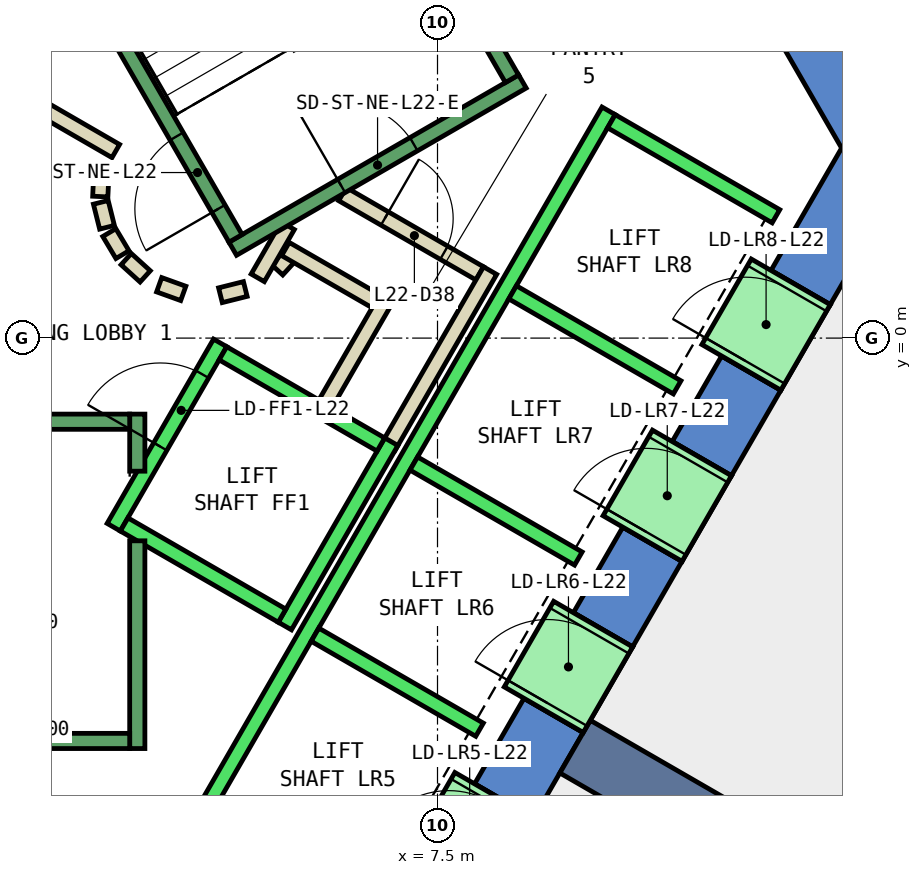
"""IFC4 building model, lengths in metres.
Left out: names, types, materials, properties, quantities, classifications, styles, units other than length and angle.
Written with IfcOpenShell. Run it as: python <this file> out.ifc"""

import sys

from ifc_helpers import new_model, si_unit, direction, frame, frame_2d, origin, place, context, subcontext, project, spatial, polyline, rectangle, outline, extrude, element, fill, save


model = new_model("IFC4")
c1 = context("Model", 3, precision=1e-05, world=origin(), true_north=direction((0.0, 1.0)))
c2 = subcontext(c1, "Body", "Model", "MODEL_VIEW")
j1 = project(units=[si_unit("LENGTHUNIT", "METRE"), si_unit("PLANEANGLEUNIT", "RADIAN")], contexts=[c1])
p1 = place(None, origin())
s1 = spatial("IfcSite", under=j1, at=p1, CompositionType="ELEMENT")
p2 = place(p1, origin())
s2 = spatial("IfcBuilding", under=s1, at=p2, CompositionType="ELEMENT")
p3 = place(p2, frame((0.0, 0.0, 103.4)))
s3 = spatial("IfcBuildingStorey", under=s2, at=p3, CompositionType="ELEMENT", Elevation=103.4)
p4 = place(p3, frame((0.0, 0.0, -0.4)))
e1 = element("IfcWall", 1, at=p4, inside=s3, PredefinedType="SHEAR", context=c2, shape_type="SweptSolid", body=[
    extrude(outline(polyline([(8.517, 11.748), (7.738, 11.298), (12.817, 2.5), (13.856, 2.5), (8.517, 11.748)])), origin(), (0.0, 0.0, 1.0), 4.2),
])
p5 = place(p3, frame((0.0, 0.0, -0.4)))
e2 = element("IfcWall", 2, at=p5, inside=s3, PredefinedType="SHEAR", context=c2, shape_type="SweptSolid", body=[
    extrude(outline(polyline([(9.417, -5.189), (8.638, -4.739), (7.988, -5.864), (8.767, -6.314), (9.417, -5.189)])), origin(), (0.0, 0.0, 1.0), 4.2),
])
p6 = place(p3, frame((0.0, 0.0, -0.4)))
e3 = element("IfcWall", 3, at=p6, inside=s3, PredefinedType="SHEAR", context=c2, shape_type="SweptSolid", body=[
    extrude(outline(polyline([(10.717, -2.937), (9.938, -2.487), (9.288, -3.613), (10.067, -4.063), (10.717, -2.937)])), origin(), (0.0, 0.0, 1.0), 4.2),
])
p7 = place(p3, frame((0.0, 0.0, -0.4)))
e4 = element("IfcWall", 4, at=p7, inside=s3, PredefinedType="SHEAR", context=c2, shape_type="SweptSolid", body=[
    extrude(outline(polyline([(12.017, -0.686), (11.238, -0.236), (10.588, -1.361), (11.367, -1.811), (12.017, -0.686)])), origin(), (0.0, 0.0, 1.0), 4.2),
])
p8 = place(p3, frame((0.0, 0.0, -0.4)))
e5 = element("IfcWall", 5, at=p8, inside=s3, PredefinedType="SHEAR", context=c2, shape_type="SweptSolid", body=[
    extrude(outline(polyline([(11.888, 0.89), (12.667, 0.44), (13.856, 2.5), (12.817, 2.5), (11.888, 0.89)])), origin(), (0.0, 0.0, 1.0), 4.2),
])
p9 = place(p3, frame((0.0, 0.0, 3.6)))
e6 = element("IfcWall", 6, at=p9, inside=s3, PredefinedType="SHEAR", context=c2, shape_type="SweptSolid", body=[
    extrude(outline(polyline([(8.767, -6.314), (7.988, -5.864), (7.338, -6.99), (8.117, -7.44), (8.767, -6.314)])), origin(), (0.0, 0.0, 1.0), 0.2),
])
p10 = place(p3, frame((0.0, 0.0, 3.6)))
e7 = element("IfcWall", 7, at=p10, inside=s3, PredefinedType="SHEAR", context=c2, shape_type="SweptSolid", body=[
    extrude(outline(polyline([(10.067, -4.063), (9.288, -3.613), (8.638, -4.739), (9.417, -5.189), (10.067, -4.063)])), origin(), (0.0, 0.0, 1.0), 0.2),
])
p11 = place(p3, frame((0.0, 0.0, 3.6)))
e8 = element("IfcWall", 8, at=p11, inside=s3, PredefinedType="SHEAR", context=c2, shape_type="SweptSolid", body=[
    extrude(outline(polyline([(11.367, -1.811), (10.588, -1.361), (9.938, -2.487), (10.717, -2.937), (11.367, -1.811)])), origin(), (0.0, 0.0, 1.0), 0.2),
])
p12 = place(p3, frame((0.0, 0.0, 3.6)))
e9 = element("IfcWall", 9, at=p12, inside=s3, PredefinedType="SHEAR", context=c2, shape_type="SweptSolid", body=[
    extrude(outline(polyline([(12.667, 0.44), (11.888, 0.89), (11.238, -0.236), (12.017, -0.686), (12.667, 0.44)])), origin(), (0.0, 0.0, 1.0), 0.2),
])
p13 = place(p3, frame((9.31, -5.375, -0.4), z_axis=(0.0, 0.0, 1.0), x_axis=(0.866017533419, -0.500013631625, 0.0)))
e10 = element("IfcWall", 10, at=p13, inside=s3, PredefinedType="SHEAR", context=c2, shape_type="SweptSolid", body=[
    extrude(rectangle(XDim=9.0, YDim=0.8, at=frame_2d((4.5, 0.0))), origin(), (0.0, 0.0, 1.0), 4.2),
])
p14 = place(p3, frame((5.39, 0.898, 0.0), z_axis=(0.0, 0.0, 1.0), x_axis=(0.673828488714, 0.738887791073, 0.0)))
e11 = element("IfcWall", 11, at=p14, inside=s3, PredefinedType="PARTITIONING", context=c2, shape_type="SweptSolid", body=[
    extrude(rectangle(XDim=0.263, YDim=0.2, at=frame_2d((0.131, 0.0))), origin(), (0.0, 0.0, 1.0), 3.8),
])
p15 = place(p3, frame((5.499, 1.172, 0.0), z_axis=(0.0, 0.0, 1.0), x_axis=(0.866333505267, -0.499465972466, 0.0)))
e12 = element("IfcWall", 12, at=p15, inside=s3, PredefinedType="PARTITIONING", context=c2, shape_type="SweptSolid", body=[
    extrude(rectangle(XDim=1.374, YDim=0.2, at=frame_2d((0.687, 0.0))), origin(), (0.0, 0.0, 1.0), 3.8),
])
p16 = place(p3, frame((6.826, 0.522, 0.0), z_axis=(0.0, 0.0, 1.0), x_axis=(-0.500016722714, -0.866015748706, 0.0)))
e13 = element("IfcWall", 13, at=p16, inside=s3, PredefinedType="PARTITIONING", context=c2, shape_type="SweptSolid", body=[
    extrude(rectangle(XDim=1.7, YDim=0.2, at=frame_2d((0.85, 0.0))), origin(), (0.0, 0.0, 1.0), 3.8),
])
p17 = place(p3, frame((6.25, 1.894, 0.0), z_axis=(0.0, 0.0, 1.0), x_axis=(0.866043184279, -0.499969202016, 0.0)))
e14 = element("IfcWall", 14, at=p17, inside=s3, PredefinedType="PARTITIONING", context=c2, shape_type="SweptSolid", body=[
    extrude(rectangle(XDim=2.084, YDim=0.2, at=frame_2d((1.042, 0.0))), origin(), (0.0, 0.0, 1.0), 3.8),
])
p18 = place(p17, frame((0.642, 0.0, 0.0)))
e15 = element("IfcOpeningElement", 15, at=p18, cuts=e14, PredefinedType="OPENING", context=c2, shape_type="SweptSolid", body=[
    extrude(rectangle(XDim=0.9, YDim=2.1, at=frame_2d((0.45, 1.05))), frame((0.0, 0.11, 0.0), z_axis=(0.0, -1.0, 0.0), x_axis=(1.0, 0.0, 0.0)), (0.0, 0.0, 1.0), 0.22),
])
p19 = place(p3, frame((8.192, 0.888, 0.0), z_axis=(0.0, 0.0, 1.0), x_axis=(-0.499940625693, -0.866059680843, 0.0)))
e16 = element("IfcWall", 16, at=p19, inside=s3, PredefinedType="PARTITIONING", context=c2, shape_type="SweptSolid", body=[
    extrude(rectangle(XDim=2.68, YDim=0.2, at=frame_2d((1.34, 0.0))), origin(), (0.0, 0.0, 1.0), 3.8),
])
p20 = place(p3, frame((5.135, 0.793, 0.0), z_axis=(0.0, 0.0, 1.0), x_axis=(0.499526442893, 0.866298639529, 0.0)))
e17 = element("IfcWall", 17, at=p20, inside=s3, PredefinedType="PARTITIONING", context=c2, shape_type="SweptSolid", body=[
    extrude(rectangle(XDim=0.791, YDim=0.2, at=frame_2d((0.396, 0.0))), origin(), (0.0, 0.0, 1.0), 3.8),
])
p21 = place(p3, frame((2.012, 3.186, 0.0), z_axis=(0.0, 0.0, 1.0), x_axis=(0.865891012941, -0.500232699559, 0.0)))
e18 = element("IfcWall", 18, at=p21, inside=s3, PredefinedType="PARTITIONING", context=c2, shape_type="SweptSolid", body=[
    extrude(rectangle(XDim=1.449, YDim=0.2, at=frame_2d((0.725, 0.0))), origin(), (0.0, 0.0, 1.0), 3.8),
])
p22 = place(p3, frame((3.079, 2.199, 0.0), z_axis=(0.0, 0.0, 1.0), x_axis=(-0.047771483479, -0.998858290933, 0.0)))
e19 = element("IfcWall", 19, at=p22, inside=s3, PredefinedType="PARTITIONING", context=c2, shape_type="SweptSolid", body=[
    extrude(rectangle(XDim=0.337, YDim=0.2, at=frame_2d((0.169, 0.0))), origin(), (0.0, 0.0, 1.0), 3.8),
])
p23 = place(p3, frame((3.07, 1.786, 0.0), z_axis=(0.0, 0.0, 1.0), x_axis=(0.242705583207, -0.970099994784, 0.0)))
e20 = element("IfcWall", 20, at=p23, inside=s3, PredefinedType="PARTITIONING", context=c2, shape_type="SweptSolid", body=[
    extrude(rectangle(XDim=0.338, YDim=0.2, at=frame_2d((0.169, 0.0))), origin(), (0.0, 0.0, 1.0), 3.8),
])
for number, where, z_axis, x_axis in (
    (21, (3.182, 1.388, 0.0), (0.0, 0.0, 1.0), (0.512, -0.859, 0.0)),
    (22, (3.404, 1.039, 0.0), (0.0, 0.0, 1.0), (0.74, -0.672, 0.0)),
):
    element("IfcWall", number, at=place(p3, frame(where, z_axis=z_axis, x_axis=x_axis)), inside=s3, PredefinedType="PARTITIONING", context=c2, shape_type="SweptSolid", body=[
        extrude(rectangle(XDim=0.338, YDim=0.2, at=frame_2d((0.169, 0.0))), origin(), (0.0, 0.0, 1.0), 3.8),
    ])
p24 = place(p3, frame((3.838, 0.702, 0.0), z_axis=(0.0, 0.0, 1.0), x_axis=(0.941035081519, -0.338308993895, 0.0)))
e23 = element("IfcWall", 23, at=p24, inside=s3, PredefinedType="PARTITIONING", context=c2, shape_type="SweptSolid", body=[
    extrude(rectangle(XDim=0.337, YDim=0.2, at=frame_2d((0.168, 0.0))), origin(), (0.0, 0.0, 1.0), 3.8),
])
p25 = place(p3, frame((4.644, 0.564, 0.0), z_axis=(0.0, 0.0, 1.0), x_axis=(0.969929076366, 0.243387729394, 0.0)))
e24 = element("IfcWall", 24, at=p25, inside=s3, PredefinedType="PARTITIONING", context=c2, shape_type="SweptSolid", body=[
    extrude(rectangle(XDim=0.337, YDim=0.2, at=frame_2d((0.168, 0.0))), origin(), (0.0, 0.0, 1.0), 3.8),
])
p26 = place(p3, frame((18.503, 2.949, 0.0), z_axis=(0.0, 0.0, 1.0), x_axis=(-0.49997390151, -0.86604047123, 0.0)))
e25 = element("IfcWall", 25, at=p26, inside=s3, PredefinedType="PARTITIONING", context=c2, shape_type="SweptSolid", body=[
    extrude(rectangle(XDim=11.626, YDim=0.2, at=frame_2d((5.813, 0.0))), origin(), (0.0, 0.0, 1.0), 3.8),
])
p27 = place(p3, frame((3.24, -2.488, 0.0), z_axis=(0.0, 0.0, 1.0), x_axis=(0.49994636267, 0.866056369097, 0.0)))
e26 = element("IfcWall", 26, at=p27, inside=s3, PredefinedType="STANDARD", context=c2, shape_type="SweptSolid", body=[
    extrude(rectangle(XDim=2.8, YDim=0.2, at=frame_2d((1.4, 0.0))), origin(), (0.0, 0.0, 1.0), 3.8),
])
p28 = place(p27, frame((1.225, 0.0, 0.0)))
e27 = element("IfcOpeningElement", 27, at=p28, cuts=e26, PredefinedType="OPENING", context=c2, shape_type="SweptSolid", body=[
    extrude(rectangle(XDim=1.1, YDim=2.1, at=frame_2d((0.55, 1.05))), frame((0.0, 0.11, 0.0), z_axis=(0.0, -1.0, 0.0), x_axis=(1.0, 0.0, 0.0)), (0.0, 0.0, 1.0), 0.22),
])
p29 = place(p3, frame((5.492, -3.788, 0.0), z_axis=(0.0, 0.0, 1.0), x_axis=(0.500011755427, 0.866018616679, 0.0)))
e28 = element("IfcWall", 28, at=p29, inside=s3, PredefinedType="STANDARD", context=c2, shape_type="SweptSolid", body=[
    extrude(rectangle(XDim=2.8, YDim=0.2, at=frame_2d((1.4, 0.0))), origin(), (0.0, 0.0, 1.0), 3.8),
])
p30 = place(p3, frame((3.377, -2.452, 0.0), z_axis=(0.0, 0.0, 1.0), x_axis=(0.865955154139, -0.50012165622, 0.0)))
e29 = element("IfcWall", 29, at=p30, inside=s3, PredefinedType="STANDARD", context=c2, shape_type="SweptSolid", body=[
    extrude(rectangle(XDim=2.4, YDim=0.2, at=frame_2d((1.2, 0.0))), origin(), (0.0, 0.0, 1.0), 3.8),
])
p31 = place(p3, frame((4.677, -0.2, 0.0), z_axis=(0.0, 0.0, 1.0), x_axis=(0.865973769406, -0.500089422704, 0.0)))
e30 = element("IfcWall", 30, at=p31, inside=s3, PredefinedType="STANDARD", context=c2, shape_type="SweptSolid", body=[
    extrude(rectangle(XDim=2.399, YDim=0.2, at=frame_2d((1.2, 0.0))), origin(), (0.0, 0.0, 1.0), 3.8),
])
p32 = place(p3, frame((4.451, -6.19, 0.0), z_axis=(0.0, 0.0, 1.0), x_axis=(0.50000090737, 0.866024879913, 0.0)))
e31 = element("IfcWall", 31, at=p32, inside=s3, PredefinedType="STANDARD", context=c2, shape_type="SweptSolid", body=[
    extrude(rectangle(XDim=10.6, YDim=0.2, at=frame_2d((5.3, 0.0))), origin(), (0.0, 0.0, 1.0), 3.8),
])
for number, where, z_axis, x_axis in (
    (32, (5.888, -3.902, 0.0), (0.0, 0.0, 1.0), (0.866, -0.5, 0.0)),
    (33, (7.188, -1.65, 0.0), (0.0, 0.0, 1.0), (0.866, -0.5, 0.0)),
    (34, (8.488, 0.602, 0.0), (0.0, 0.0, 1.0), (0.866, -0.5, 0.0)),
):
    element("IfcWall", number, at=place(p3, frame(where, z_axis=z_axis, x_axis=x_axis)), inside=s3, PredefinedType="STANDARD", context=c2, shape_type="SweptSolid", body=[
        extrude(rectangle(XDim=2.5, YDim=0.2, at=frame_2d((1.25, 0.0))), origin(), (0.0, 0.0, 1.0), 3.8),
    ])
p33 = place(p3, frame((9.788, 2.853, 0.0), z_axis=(0.0, 0.0, 1.0), x_axis=(0.865998541277, -0.500046524342, 0.0)))
e35 = element("IfcWall", 35, at=p33, inside=s3, PredefinedType="STANDARD", context=c2, shape_type="SweptSolid", body=[
    extrude(rectangle(XDim=2.5, YDim=0.2, at=frame_2d((1.25, 0.0))), origin(), (0.0, 0.0, 1.0), 3.8),
])
p34 = place(p3, frame((7.598, -7.14, 0.0), z_axis=(0.0, 0.0, 1.0), x_axis=(0.500362116554, 0.865816234728, 0.0)))
e36 = element("IfcWall", 36, at=p34, inside=s3, PredefinedType="STANDARD", context=c2, shape_type="SweptSolid", body=[
    extrude(rectangle(XDim=1.299, YDim=1.2, at=frame_2d((0.65, 0.0))), origin(), (0.0, 0.0, 1.0), 2.4),
])
p35 = place(p34, frame((0.1, 0.0, 0.0)))
e37 = element("IfcOpeningElement", 37, at=p35, cuts=e36, PredefinedType="OPENING", context=c2, shape_type="SweptSolid", body=[
    extrude(rectangle(XDim=1.1, YDim=2.3, at=frame_2d((0.55, 1.15))), frame((0.0, 0.61, 0.0), z_axis=(0.0, -1.0, 0.0), x_axis=(1.0, 0.0, 0.0)), (0.0, 0.0, 1.0), 1.22),
])
p36 = place(p3, frame((8.898, -4.889, 0.0), z_axis=(0.0, 0.0, 1.0), x_axis=(0.500036693733, 0.866004217611, 0.0)))
e38 = element("IfcWall", 38, at=p36, inside=s3, PredefinedType="STANDARD", context=c2, shape_type="SweptSolid", body=[
    extrude(rectangle(XDim=1.3, YDim=1.2, at=frame_2d((0.65, 0.0))), origin(), (0.0, 0.0, 1.0), 2.4),
])
p37 = place(p36, frame((0.1, 0.0, 0.0)))
e39 = element("IfcOpeningElement", 39, at=p37, cuts=e38, PredefinedType="OPENING", context=c2, shape_type="SweptSolid", body=[
    extrude(rectangle(XDim=1.1, YDim=2.3, at=frame_2d((0.55, 1.15))), frame((0.0, 0.61, 0.0), z_axis=(0.0, -1.0, 0.0), x_axis=(1.0, 0.0, 0.0)), (0.0, 0.0, 1.0), 1.22),
])
p38 = place(p3, frame((10.198, -2.637, 0.0), z_axis=(0.0, 0.0, 1.0), x_axis=(0.49989585183, 0.866085525409, 0.0)))
e40 = element("IfcWall", 40, at=p38, inside=s3, PredefinedType="STANDARD", context=c2, shape_type="SweptSolid", body=[
    extrude(rectangle(XDim=1.3, YDim=1.2, at=frame_2d((0.65, 0.0))), origin(), (0.0, 0.0, 1.0), 2.4),
])
p39 = place(p38, frame((0.1, 0.0, 0.0)))
e41 = element("IfcOpeningElement", 41, at=p39, cuts=e40, PredefinedType="OPENING", context=c2, shape_type="SweptSolid", body=[
    extrude(rectangle(XDim=1.1, YDim=2.3, at=frame_2d((0.55, 1.15))), frame((0.0, 0.61, 0.0), z_axis=(0.0, -1.0, 0.0), x_axis=(1.0, 0.0, 0.0)), (0.0, 0.0, 1.0), 1.22),
])
p40 = place(p3, frame((11.498, -0.385, 0.0), z_axis=(0.0, 0.0, 1.0), x_axis=(0.500221244143, 0.865897630733, 0.0)))
e42 = element("IfcWall", 42, at=p40, inside=s3, PredefinedType="STANDARD", context=c2, shape_type="SweptSolid", body=[
    extrude(rectangle(XDim=1.299, YDim=1.2, at=frame_2d((0.65, 0.0))), origin(), (0.0, 0.0, 1.0), 2.4),
])
p41 = place(p40, frame((0.1, 0.0, 0.0)))
e43 = element("IfcOpeningElement", 43, at=p41, cuts=e42, PredefinedType="OPENING", context=c2, shape_type="SweptSolid", body=[
    extrude(rectangle(XDim=1.1, YDim=2.3, at=frame_2d((0.55, 1.15))), frame((0.0, 0.61, 0.0), z_axis=(0.0, -1.0, 0.0), x_axis=(1.0, 0.0, 0.0)), (0.0, 0.0, 1.0), 1.22),
])
p42 = place(p3, frame((3.55, -2.667, 0.0), z_axis=(0.0, 0.0, 1.0), x_axis=(0.0, -1.0, 0.0)))
e44 = element("IfcWall", 44, at=p42, inside=s3, PredefinedType="STANDARD", context=c2, shape_type="SweptSolid", body=[
    extrude(rectangle(XDim=2.733, YDim=0.2, at=frame_2d((1.366, 0.0))), origin(), (0.0, 0.0, 1.0), 3.8),
])
p43 = place(p3, frame((3.55, -1.0, 0.0), z_axis=(0.0, 0.0, 1.0), x_axis=(0.0, -1.0, 0.0)))
e45 = element("IfcWall", 45, at=p43, inside=s3, PredefinedType="STANDARD", context=c2, shape_type="SweptSolid", body=[
    extrude(rectangle(XDim=0.751, YDim=0.2, at=frame_2d((0.375, 0.0))), origin(), (0.0, 0.0, 1.0), 3.8),
])
p44 = place(p3, frame((-3.45, -1.1, 0.0), z_axis=(0.0, 0.0, 1.0), x_axis=(1.0, 0.0, 0.0)))
e46 = element("IfcWall", 46, at=p44, inside=s3, PredefinedType="STANDARD", context=c2, shape_type="SweptSolid", body=[
    extrude(rectangle(XDim=6.9, YDim=0.2, at=frame_2d((3.45, 0.0))), origin(), (0.0, 0.0, 1.0), 3.8),
])
p45 = place(p44, frame((0.45, 0.0, 0.0)))
e47 = element("IfcOpeningElement", 47, at=p45, cuts=e46, PredefinedType="OPENING", context=c2, shape_type="SweptSolid", body=[
    extrude(rectangle(XDim=1.1, YDim=2.2, at=frame_2d((0.55, 1.1))), frame((0.0, 0.11, 0.0), z_axis=(0.0, -1.0, 0.0), x_axis=(1.0, 0.0, 0.0)), (0.0, 0.0, 1.0), 0.22),
])
p46 = place(p3, frame((-3.45, -5.3, 0.0), z_axis=(0.0, 0.0, 1.0), x_axis=(1.0, 0.0, 0.0)))
e48 = element("IfcWall", 48, at=p46, inside=s3, PredefinedType="STANDARD", context=c2, shape_type="SweptSolid", body=[
    extrude(rectangle(XDim=6.9, YDim=0.2, at=frame_2d((3.45, 0.0))), origin(), (0.0, 0.0, 1.0), 3.8),
])
p47 = place(p3, frame((4.806, 1.176, 0.0), z_axis=(0.0, 0.0, 1.0), x_axis=(0.866059941101, 0.499940174841, 0.0)))
e49 = element("IfcWall", 49, at=p47, inside=s3, PredefinedType="STANDARD", context=c2, shape_type="SweptSolid", body=[
    extrude(rectangle(XDim=4.4, YDim=0.2, at=frame_2d((2.2, 0.0))), origin(), (0.0, 0.0, 1.0), 3.8),
])
p48 = place(p47, frame((1.65, 0.0, 0.0)))
e50 = element("IfcOpeningElement", 50, at=p48, cuts=e49, PredefinedType="OPENING", context=c2, shape_type="SweptSolid", body=[
    extrude(rectangle(XDim=1.1, YDim=2.2, at=frame_2d((0.55, 1.1))), frame((0.0, 0.11, 0.0), z_axis=(0.0, -1.0, 0.0), x_axis=(1.0, 0.0, 0.0)), (0.0, 0.0, 1.0), 0.22),
])
p49 = place(p3, frame((4.843, 1.312, 0.0), z_axis=(0.0, 0.0, 1.0), x_axis=(-0.499963383562, 0.866046543262, 0.0)))
e51 = element("IfcWall", 51, at=p49, inside=s3, PredefinedType="STANDARD", context=c2, shape_type="SweptSolid", body=[
    extrude(rectangle(XDim=6.9, YDim=0.2, at=frame_2d((3.45, 0.0))), origin(), (0.0, 0.0, 1.0), 3.8),
])
p50 = place(p49, frame((0.45, 0.0, 0.0)))
e52 = element("IfcOpeningElement", 52, at=p50, cuts=e51, PredefinedType="OPENING", context=c2, shape_type="SweptSolid", body=[
    extrude(rectangle(XDim=1.1, YDim=2.2, at=frame_2d((0.55, 1.1))), frame((0.0, 0.11, 0.0), z_axis=(0.0, -1.0, 0.0), x_axis=(1.0, 0.0, 0.0)), (0.0, 0.0, 1.0), 0.22),
])
p51 = place(p3, frame((8.48, 3.412, 0.0), z_axis=(0.0, 0.0, 1.0), x_axis=(-0.499978703459, 0.866037698999, 0.0)))
e53 = element("IfcWall", 53, at=p51, inside=s3, PredefinedType="STANDARD", context=c2, shape_type="SweptSolid", body=[
    extrude(rectangle(XDim=6.9, YDim=0.2, at=frame_2d((3.45, 0.0))), origin(), (0.0, 0.0, 1.0), 3.8),
])
p52 = place(p18, origin())
e54 = element("IfcDoor", 54, at=p52, inside=s3, OperationType="SINGLE_SWING_LEFT", PredefinedType="DOOR", context=c2, shape_type="SweptSolid", body=[
    extrude(rectangle(XDim=0.9, YDim=2.1, at=frame_2d((0.45, 1.05))), frame((0.0, 0.025, 0.0), z_axis=(0.0, -1.0, 0.0), x_axis=(1.0, 0.0, 0.0)), (0.0, 0.0, 1.0), 0.05),
])
fill(e15, e54)
p53 = place(p37, origin())
e55 = element("IfcDoor", 55, at=p53, inside=s3, OperationType="SLIDING_TO_LEFT", PredefinedType="DOOR", context=c2, shape_type="SweptSolid", body=[
    extrude(rectangle(XDim=1.1, YDim=2.3, at=frame_2d((0.55, 1.15))), frame((0.0, 0.025, 0.0), z_axis=(0.0, -1.0, 0.0), x_axis=(1.0, 0.0, 0.0)), (0.0, 0.0, 1.0), 0.05),
])
fill(e39, e55)
p54 = place(p39, origin())
e56 = element("IfcDoor", 56, at=p54, inside=s3, OperationType="SLIDING_TO_LEFT", PredefinedType="DOOR", context=c2, shape_type="SweptSolid", body=[
    extrude(rectangle(XDim=1.1, YDim=2.3, at=frame_2d((0.55, 1.15))), frame((0.0, 0.025, 0.0), z_axis=(0.0, -1.0, 0.0), x_axis=(1.0, 0.0, 0.0)), (0.0, 0.0, 1.0), 0.05),
])
fill(e41, e56)
p55 = place(p41, origin())
e57 = element("IfcDoor", 57, at=p55, inside=s3, OperationType="SLIDING_TO_LEFT", PredefinedType="DOOR", context=c2, shape_type="SweptSolid", body=[
    extrude(rectangle(XDim=1.1, YDim=2.3, at=frame_2d((0.55, 1.15))), frame((0.0, 0.025, 0.0), z_axis=(0.0, -1.0, 0.0), x_axis=(1.0, 0.0, 0.0)), (0.0, 0.0, 1.0), 0.05),
])
fill(e43, e57)
p56 = place(p28, origin())
e58 = element("IfcDoor", 58, at=p56, inside=s3, OperationType="SLIDING_TO_LEFT", PredefinedType="DOOR", context=c2, shape_type="SweptSolid", body=[
    extrude(rectangle(XDim=1.1, YDim=2.1, at=frame_2d((0.55, 1.05))), frame((0.0, 0.025, 0.0), z_axis=(0.0, -1.0, 0.0), x_axis=(1.0, 0.0, 0.0)), (0.0, 0.0, 1.0), 0.05),
])
fill(e27, e58)
p57 = place(p50, origin())
e59 = element("IfcDoor", 59, at=p57, inside=s3, OperationType="SINGLE_SWING_LEFT", PredefinedType="DOOR", context=c2, shape_type="SweptSolid", body=[
    extrude(rectangle(XDim=1.1, YDim=2.2, at=frame_2d((0.55, 1.1))), frame((0.0, 0.025, 0.0), z_axis=(0.0, -1.0, 0.0), x_axis=(1.0, 0.0, 0.0)), (0.0, 0.0, 1.0), 0.05),
])
fill(e52, e59)
p58 = place(p48, origin())
e60 = element("IfcDoor", 60, at=p58, inside=s3, OperationType="SINGLE_SWING_LEFT", PredefinedType="DOOR", context=c2, shape_type="SweptSolid", body=[
    extrude(rectangle(XDim=1.1, YDim=2.2, at=frame_2d((0.55, 1.1))), frame((0.0, 0.025, 0.0), z_axis=(0.0, -1.0, 0.0), x_axis=(1.0, 0.0, 0.0)), (0.0, 0.0, 1.0), 0.05),
])
fill(e50, e60)
save(model, sys.argv[1])
